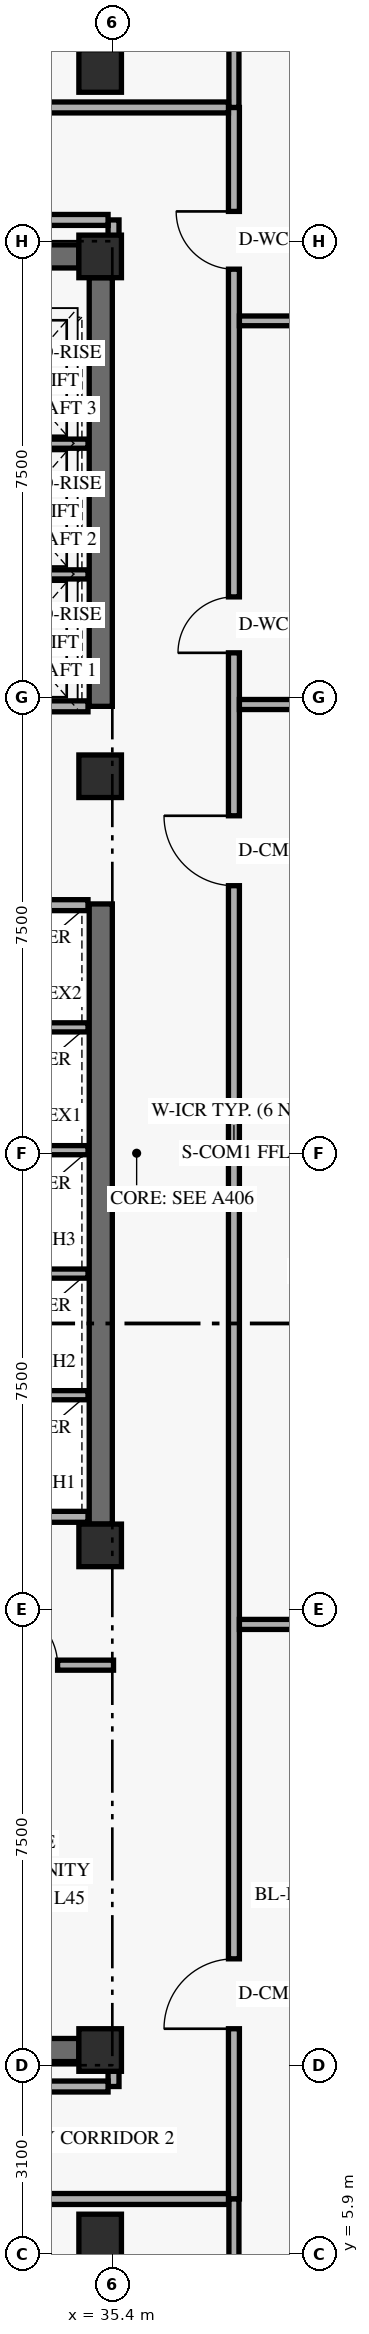
"""IFC4 building model, lengths in metres.
Left out: names, types, materials, properties, quantities, classifications, styles, units other than length and angle.
Written with IfcOpenShell. Run it as: python <this file> out.ifc"""

import sys

from ifc_helpers import new_model, si_unit, direction, frame, frame_2d, origin, origin_2d, place, context, subcontext, project, spatial, rectangle, extrude, element, fill, save


model = new_model("IFC4")
c1 = context("Model", 3, precision=1e-05, world=origin(), true_north=direction((0.0, 1.0)))
c2 = subcontext(c1, "Body", "Model", "MODEL_VIEW")
j1 = project(units=[si_unit("LENGTHUNIT", "METRE"), si_unit("PLANEANGLEUNIT", "RADIAN")], contexts=[c1])
p1 = place(None, origin())
s1 = spatial("IfcSite", under=j1, at=p1, CompositionType="ELEMENT")
p2 = place(p1, origin())
s2 = spatial("IfcBuilding", under=s1, at=p2, CompositionType="ELEMENT")
p3 = place(p2, frame((0.0, 0.0, 173.4)))
s3 = spatial("IfcBuildingStorey", under=s2, at=p3, CompositionType="ELEMENT", Elevation=173.4)
p4 = place(p3, frame((35.21, 17.9, 0.0), z_axis=(0.0, 0.0, 1.0), x_axis=(0.0, 1.0, 0.0)))
e1 = element("IfcWall", 1, at=p4, inside=s3, PredefinedType="SHEAR", context=c2, shape_type="SweptSolid", body=[
    extrude(rectangle(XDim=10.2, YDim=0.38, at=frame_2d((5.1, 0.0))), origin(), (0.0, 0.0, 1.0), 3.348),
])
p5 = place(p3, frame((35.21, 31.35, 0.0), z_axis=(0.0, 0.0, 1.0), x_axis=(0.0, 1.0, 0.0)))
e2 = element("IfcWall", 2, at=p5, inside=s3, PredefinedType="SHEAR", context=c2, shape_type="SweptSolid", body=[
    extrude(rectangle(XDim=7.05, YDim=0.38, at=frame_2d((3.525, 0.0))), origin(), (0.0, 0.0, 1.0), 3.348),
])
for number, where, z_axis, x_axis in (
    (3, (24.55, 9.25, 0.0), (0.0, 0.0, 1.0), (1.0, 0.0, 0.0)),
    (4, (24.55, 38.75, 0.0), (0.0, 0.0, 1.0), (1.0, 0.0, 0.0)),
):
    element("IfcWall", number, at=place(p3, frame(where, z_axis=z_axis, x_axis=x_axis)), inside=s3, PredefinedType="SHEAR", context=c2, shape_type="SweptSolid", body=[
        extrude(rectangle(XDim=10.3, YDim=0.38, at=frame_2d((5.15, 0.0))), origin(), (0.0, 0.0, 1.0), 3.96),
    ])
for number, where, z_axis, x_axis in (
    (5, (35.2, 6.2, 0.0), (0.0, 0.0, 1.0), (1.0, 0.0, 0.0)),
    (6, (35.2, 9.25, 0.0), (0.0, 0.0, 1.0), (1.0, 0.0, 0.0)),
    (7, (35.2, 17.55, 0.0), (0.0, 0.0, 1.0), (1.0, 0.0, 0.0)),
    (8, (35.2, 30.2, 0.0), (0.0, 0.0, 1.0), (1.0, 0.0, 0.0)),
    (9, (35.2, 38.75, 0.0), (0.0, 0.0, 1.0), (1.0, 0.0, 0.0)),
    (10, (35.2, 41.8, 0.0), (0.0, 0.0, 1.0), (1.0, 0.0, 0.0)),
):
    element("IfcColumn", number, at=place(p3, frame(where, z_axis=z_axis, x_axis=x_axis)), inside=s3, PredefinedType="COLUMN", context=c2, shape_type="SweptSolid", body=[
        extrude(rectangle(XDim=0.7, YDim=0.7, at=origin_2d()), origin(), (0.0, 0.0, 1.0), 4.2),
    ])
for number, where, z_axis, x_axis in (
    (11, (32.74, 18.02, 0.0), (0.0, 0.0, 1.0), (1.0, 0.0, 0.0)),
    (12, (32.74, 28.08, 0.0), (0.0, 0.0, 1.0), (1.0, 0.0, 0.0)),
):
    element("IfcWall", number, at=place(p3, frame(where, z_axis=z_axis, x_axis=x_axis)), inside=s3, PredefinedType="STANDARD", context=c2, shape_type="SweptSolid", body=[
        extrude(rectangle(XDim=2.26, YDim=0.18, at=frame_2d((1.13, 0.0))), origin(), (0.0, 0.0, 1.0), 3.96),
    ])
for number, where, z_axis, x_axis in (
    (13, (32.74, 20.02, 0.0), (0.0, 0.0, 1.0), (1.0, 0.0, 0.0)),
    (14, (32.74, 22.02, 0.0), (0.0, 0.0, 1.0), (1.0, 0.0, 0.0)),
    (15, (32.74, 24.05, 0.0), (0.0, 0.0, 1.0), (1.0, 0.0, 0.0)),
    (16, (32.74, 26.07, 0.0), (0.0, 0.0, 1.0), (1.0, 0.0, 0.0)),
):
    element("IfcWall", number, at=place(p3, frame(where, z_axis=z_axis, x_axis=x_axis)), inside=s3, PredefinedType="STANDARD", context=c2, shape_type="SweptSolid", body=[
        extrude(rectangle(XDim=2.26, YDim=0.15, at=frame_2d((1.13, 0.0))), origin(), (0.0, 0.0, 1.0), 3.96),
    ])
p6 = place(p3, frame((32.74, 31.35, 0.0), z_axis=(0.0, 0.0, 1.0), x_axis=(1.0, 0.0, 0.0)))
e17 = element("IfcWall", 17, at=p6, inside=s3, PredefinedType="STANDARD", context=c2, shape_type="SweptSolid", body=[
    extrude(rectangle(XDim=2.26, YDim=0.18, at=frame_2d((1.13, 0.0))), origin(), (0.0, 0.0, 1.0), 3.96),
])
for number, where, z_axis, x_axis in (
    (18, (32.74, 33.52, 0.0), (0.0, 0.0, 1.0), (1.0, 0.0, 0.0)),
    (19, (32.74, 35.67, 0.0), (0.0, 0.0, 1.0), (1.0, 0.0, 0.0)),
):
    element("IfcWall", number, at=place(p3, frame(where, z_axis=z_axis, x_axis=x_axis)), inside=s3, PredefinedType="STANDARD", context=c2, shape_type="SweptSolid", body=[
        extrude(rectangle(XDim=2.26, YDim=0.15, at=frame_2d((1.13, 0.0))), origin(), (0.0, 0.0, 1.0), 3.96),
    ])
p7 = place(p3, frame((37.4, 6.8, 0.0), z_axis=(0.0, 0.0, 1.0), x_axis=(0.0, 1.0, 0.0)))
e20 = element("IfcWall", 20, at=p7, inside=s3, PredefinedType="STANDARD", context=c2, shape_type="SweptSolid", body=[
    extrude(rectangle(XDim=34.4, YDim=0.18, at=frame_2d((17.2, 0.0))), origin(), (0.0, 0.0, 1.0), 3.33),
])
p8 = place(p7, frame((25.43, 0.0, 0.0)))
e21 = element("IfcOpeningElement", 21, at=p8, cuts=e20, PredefinedType="OPENING", context=c2, shape_type="SweptSolid", body=[
    extrude(rectangle(XDim=0.92, YDim=2.14, at=frame_2d((0.46, 1.07))), frame((0.0, 0.1, 0.0), z_axis=(0.0, -1.0, 0.0), x_axis=(1.0, 0.0, 0.0)), (0.0, 0.0, 1.0), 0.2),
])
p9 = place(p7, frame((31.74, 0.0, 0.0)))
e22 = element("IfcOpeningElement", 22, at=p9, cuts=e20, PredefinedType="OPENING", context=c2, shape_type="SweptSolid", body=[
    extrude(rectangle(XDim=0.95, YDim=2.14, at=frame_2d((0.475, 1.07))), frame((0.0, 0.1, 0.0), z_axis=(0.0, -1.0, 0.0), x_axis=(1.0, 0.0, 0.0)), (0.0, 0.0, 1.0), 0.2),
])
p10 = place(p7, frame((2.8, 0.0, 0.0)))
e23 = element("IfcOpeningElement", 23, at=p10, cuts=e20, PredefinedType="OPENING", context=c2, shape_type="SweptSolid", body=[
    extrude(rectangle(XDim=1.15, YDim=2.15, at=frame_2d((0.575, 1.075))), frame((0.0, 0.1, 0.0), z_axis=(0.0, -1.0, 0.0), x_axis=(1.0, 0.0, 0.0)), (0.0, 0.0, 1.0), 0.2),
])
p11 = place(p7, frame((21.6, 0.0, 0.0)))
e24 = element("IfcOpeningElement", 24, at=p11, cuts=e20, PredefinedType="OPENING", context=c2, shape_type="SweptSolid", body=[
    extrude(rectangle(XDim=1.15, YDim=2.15, at=frame_2d((0.575, 1.075))), frame((0.0, 0.1, 0.0), z_axis=(0.0, -1.0, 0.0), x_axis=(1.0, 0.0, 0.0)), (0.0, 0.0, 1.0), 0.2),
])
for number, where, z_axis, x_axis in (
    (25, (37.4, 4.28, 0.0), (0.0, 0.0, 1.0), (0.0, 1.0, 0.0)),
    (26, (37.4, 41.2, 0.0), (0.0, 0.0, 1.0), (0.0, 1.0, 0.0)),
):
    element("IfcWall", number, at=place(p3, frame(where, z_axis=z_axis, x_axis=x_axis)), inside=s3, PredefinedType="PARTITIONING", context=c2, shape_type="SweptSolid", body=[
        extrude(rectangle(XDim=2.52, YDim=0.165, at=frame_2d((1.26, 0.0))), origin(), (0.0, 0.0, 1.0), 3.479),
    ])
for number, where, z_axis, x_axis in (
    (27, (35.42, 8.65, 0.0), (0.0, 0.0, 1.0), (0.0, 1.0, 0.0)),
    (28, (35.42, 38.75, 0.0), (0.0, 0.0, 1.0), (0.0, 1.0, 0.0)),
):
    element("IfcWall", number, at=place(p3, frame(where, z_axis=z_axis, x_axis=x_axis)), inside=s3, PredefinedType="STANDARD", context=c2, shape_type="SweptSolid", body=[
        extrude(rectangle(XDim=0.6, YDim=0.18, at=frame_2d((0.3, 0.0))), origin(), (0.0, 0.0, 1.0), 3.33),
    ])
for number, where, z_axis, x_axis in (
    (29, (37.49, 16.25, 0.0), (0.0, 0.0, 1.0), (1.0, 0.0, 0.0)),
    (30, (37.49, 31.38, 0.0), (0.0, 0.0, 1.0), (1.0, 0.0, 0.0)),
):
    element("IfcWall", number, at=place(p3, frame(where, z_axis=z_axis, x_axis=x_axis)), inside=s3, PredefinedType="PARTITIONING", context=c2, shape_type="SweptSolid", body=[
        extrude(rectangle(XDim=20.83, YDim=0.165, at=frame_2d((10.415, 0.0))), origin(), (0.0, 0.0, 1.0), 3.33),
    ])
p12 = place(p3, frame((37.49, 37.69, 0.0), z_axis=(0.0, 0.0, 1.0), x_axis=(1.0, 0.0, 0.0)))
e31 = element("IfcWall", 31, at=p12, inside=s3, PredefinedType="PLUMBINGWALL", context=c2, shape_type="SweptSolid", body=[
    extrude(rectangle(XDim=5.93, YDim=0.16, at=frame_2d((2.965, 0.0))), origin(), (0.0, 0.0, 1.0), 3.96),
])
p13 = place(p3, frame((32.732, 15.58, 0.0), z_axis=(0.0, 0.0, 1.0), x_axis=(1.0, 0.0, 0.0)))
e32 = element("IfcWall", 32, at=p13, inside=s3, PredefinedType="PARTITIONING", context=c2, shape_type="SweptSolid", body=[
    extrude(rectangle(XDim=2.688, YDim=0.165, at=frame_2d((1.344, 0.0))), origin(), (0.0, 0.0, 1.0), 3.33),
])
p14 = place(p13, frame((0.817, 0.0, 0.0)))
e33 = element("IfcOpeningElement", 33, at=p14, cuts=e32, PredefinedType="OPENING", context=c2, shape_type="SweptSolid", body=[
    extrude(rectangle(XDim=0.95, YDim=2.15, at=frame_2d((0.475, 1.075))), frame((0.0, 0.093, 0.0), z_axis=(0.0, -1.0, 0.0), x_axis=(1.0, 0.0, 0.0)), (0.0, 0.0, 1.0), 0.185),
])
p15 = place(p3, frame((21.74, 6.8, 0.0), z_axis=(0.0, 0.0, 1.0), x_axis=(1.0, 0.0, 0.0)))
e34 = element("IfcWall", 34, at=p15, inside=s3, PredefinedType="STANDARD", context=c2, shape_type="SweptSolid", body=[
    extrude(rectangle(XDim=15.57, YDim=0.18, at=frame_2d((7.785, 0.0))), origin(), (0.0, 0.0, 1.0), 3.33),
])
p16 = place(p15, frame((5.41, 0.0, 0.0)))
e35 = element("IfcOpeningElement", 35, at=p16, cuts=e34, PredefinedType="OPENING", context=c2, shape_type="SweptSolid", body=[
    extrude(rectangle(XDim=0.95, YDim=2.15, at=frame_2d((0.475, 1.075))), frame((0.0, 0.1, 0.0), z_axis=(0.0, -1.0, 0.0), x_axis=(1.0, 0.0, 0.0)), (0.0, 0.0, 1.0), 0.2),
])
p17 = place(p3, frame((23.85, 8.65, 0.0), z_axis=(0.0, 0.0, 1.0), x_axis=(1.0, 0.0, 0.0)))
e36 = element("IfcWall", 36, at=p17, inside=s3, PredefinedType="STANDARD", context=c2, shape_type="SweptSolid", body=[
    extrude(rectangle(XDim=11.48, YDim=0.18, at=frame_2d((5.74, 0.0))), origin(), (0.0, 0.0, 1.0), 3.33),
])
p18 = place(p3, frame((21.74, 41.2, 0.0), z_axis=(0.0, 0.0, 1.0), x_axis=(1.0, 0.0, 0.0)))
e37 = element("IfcWall", 37, at=p18, inside=s3, PredefinedType="STANDARD", context=c2, shape_type="SweptSolid", body=[
    extrude(rectangle(XDim=15.57, YDim=0.18, at=frame_2d((7.785, 0.0))), origin(), (0.0, 0.0, 1.0), 3.33),
])
p19 = place(p18, frame((5.41, 0.0, 0.0)))
e38 = element("IfcOpeningElement", 38, at=p19, cuts=e37, PredefinedType="OPENING", context=c2, shape_type="SweptSolid", body=[
    extrude(rectangle(XDim=0.95, YDim=2.15, at=frame_2d((0.475, 1.075))), frame((0.0, 0.1, 0.0), z_axis=(0.0, -1.0, 0.0), x_axis=(1.0, 0.0, 0.0)), (0.0, 0.0, 1.0), 0.2),
])
p20 = place(p3, frame((23.85, 39.35, 0.0), z_axis=(0.0, 0.0, 1.0), x_axis=(1.0, 0.0, 0.0)))
e39 = element("IfcWall", 39, at=p20, inside=s3, PredefinedType="STANDARD", context=c2, shape_type="SweptSolid", body=[
    extrude(rectangle(XDim=11.48, YDim=0.18, at=frame_2d((5.74, 0.0))), origin(), (0.0, 0.0, 1.0), 3.33),
])
p21 = place(p8, origin())
e40 = element("IfcDoor", 40, at=p21, inside=s3, OperationType="SINGLE_SWING_LEFT", PredefinedType="DOOR", context=c2, shape_type="SweptSolid", body=[
    extrude(rectangle(XDim=0.92, YDim=2.14, at=frame_2d((0.46, 1.07))), frame((0.0, 0.025, 0.0), z_axis=(0.0, -1.0, 0.0), x_axis=(1.0, 0.0, 0.0)), (0.0, 0.0, 1.0), 0.05),
])
fill(e21, e40)
p22 = place(p9, origin())
e41 = element("IfcDoor", 41, at=p22, inside=s3, OperationType="SINGLE_SWING_RIGHT", PredefinedType="DOOR", context=c2, shape_type="SweptSolid", body=[
    extrude(rectangle(XDim=0.95, YDim=2.14, at=frame_2d((0.475, 1.07))), frame((0.0, 0.025, 0.0), z_axis=(0.0, -1.0, 0.0), x_axis=(1.0, 0.0, 0.0)), (0.0, 0.0, 1.0), 0.05),
])
fill(e22, e41)
p23 = place(p14, origin())
e42 = element("IfcDoor", 42, at=p23, inside=s3, OperationType="SINGLE_SWING_LEFT", PredefinedType="DOOR", context=c2, shape_type="SweptSolid", body=[
    extrude(rectangle(XDim=0.95, YDim=2.15, at=frame_2d((0.475, 1.075))), frame((0.0, 0.025, 0.0), z_axis=(0.0, -1.0, 0.0), x_axis=(1.0, 0.0, 0.0)), (0.0, 0.0, 1.0), 0.05),
])
fill(e33, e42)
p24 = place(p10, origin())
e43 = element("IfcDoor", 43, at=p24, inside=s3, OperationType="SINGLE_SWING_LEFT", PredefinedType="DOOR", context=c2, shape_type="SweptSolid", body=[
    extrude(rectangle(XDim=1.15, YDim=2.15, at=frame_2d((0.575, 1.075))), frame((0.0, 0.025, 0.0), z_axis=(0.0, -1.0, 0.0), x_axis=(1.0, 0.0, 0.0)), (0.0, 0.0, 1.0), 0.05),
])
fill(e23, e43)
p25 = place(p11, origin())
e44 = element("IfcDoor", 44, at=p25, inside=s3, OperationType="SINGLE_SWING_RIGHT", PredefinedType="DOOR", context=c2, shape_type="SweptSolid", body=[
    extrude(rectangle(XDim=1.15, YDim=2.15, at=frame_2d((0.575, 1.075))), frame((0.0, 0.025, 0.0), z_axis=(0.0, -1.0, 0.0), x_axis=(1.0, 0.0, 0.0)), (0.0, 0.0, 1.0), 0.05),
])
fill(e24, e44)
save(model, sys.argv[1])
